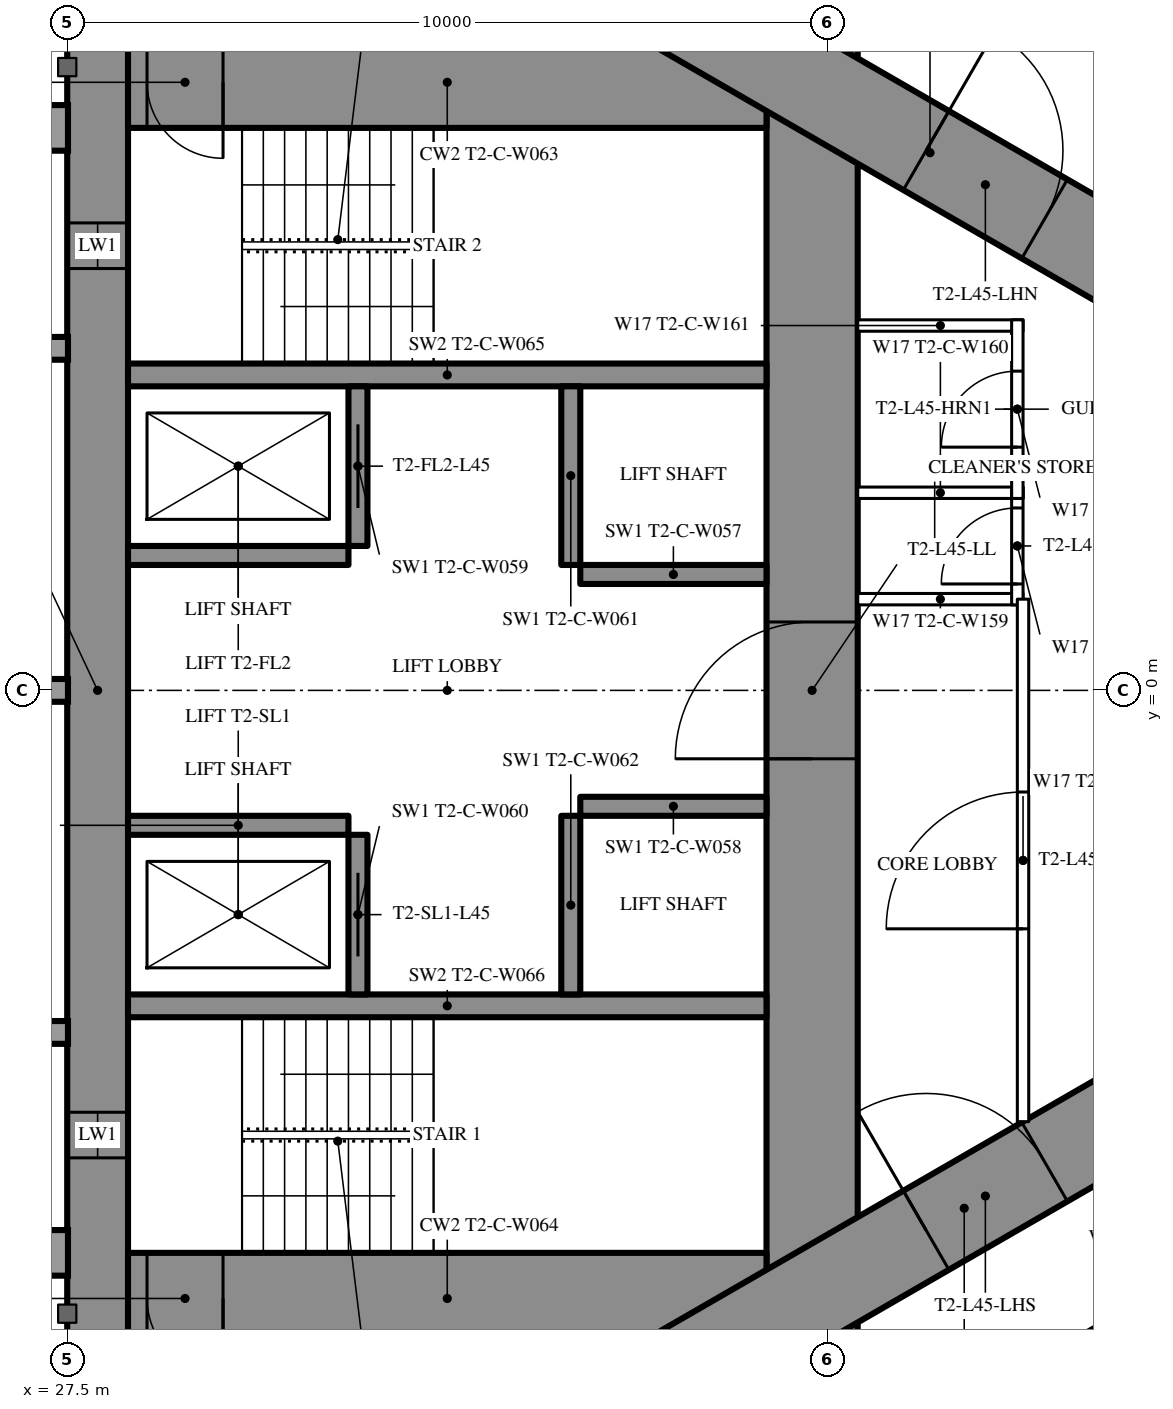
"""IFC4 building model, lengths in metres.
Left out: names, types, materials, properties, quantities, classifications, styles, units other than length and angle.
Written with IfcOpenShell. Run it as: python <this file> out.ifc"""

import sys

from ifc_helpers import new_model, si_unit, direction, frame, frame_2d, origin, place, context, subcontext, project, spatial, rectangle, extrude, element, fill, save


model = new_model("IFC4")
c1 = context("Model", 3, precision=1e-05, world=origin(), true_north=direction((0.0, 1.0)))
c2 = subcontext(c1, "Body", "Model", "MODEL_VIEW")
j1 = project(units=[si_unit("LENGTHUNIT", "METRE"), si_unit("PLANEANGLEUNIT", "RADIAN")], contexts=[c1])
p1 = place(None, origin())
s1 = spatial("IfcSite", under=j1, at=p1, CompositionType="ELEMENT")
p2 = place(p1, origin())
s2 = spatial("IfcBuilding", under=s1, at=p2, CompositionType="ELEMENT")
p3 = place(p2, frame((0.0, 0.0, 170.3)))
s3 = spatial("IfcBuildingStorey", under=s2, at=p3, CompositionType="ELEMENT", Elevation=170.3)
p4 = place(p3, frame((27.9, -8.6, 0.0), z_axis=(0.0, 0.0, 1.0), x_axis=(0.0, 1.0, 0.0)))
e1 = element("IfcWall", 1, at=p4, inside=s3, PredefinedType="SHEAR", context=c2, shape_type="SweptSolid", body=[
    extrude(rectangle(XDim=17.2, YDim=0.8, at=frame_2d((8.6, 0.0))), origin(), (0.0, 0.0, 1.0), 3.5),
])
p5 = place(p4, frame((2.45, 0.0, 0.6)))
e2 = element("IfcOpeningElement", 2, at=p5, cuts=e1, PredefinedType="OPENING", context=c2, shape_type="SweptSolid", body=[
    extrude(rectangle(XDim=0.6, YDim=2.1, at=frame_2d((0.3, 1.05))), frame((0.0, 0.41, 0.0), z_axis=(0.0, -1.0, 0.0), x_axis=(1.0, 0.0, 0.0)), (0.0, 0.0, 1.0), 0.82),
])
p6 = place(p4, frame((14.15, 0.0, 0.6)))
e3 = element("IfcOpeningElement", 3, at=p6, cuts=e1, PredefinedType="OPENING", context=c2, shape_type="SweptSolid", body=[
    extrude(rectangle(XDim=0.6, YDim=2.1, at=frame_2d((0.3, 1.05))), frame((0.0, 0.41, 0.0), z_axis=(0.0, -1.0, 0.0), x_axis=(1.0, 0.0, 0.0)), (0.0, 0.0, 1.0), 0.82),
])
p7 = place(p3, frame((37.3, -8.6, 0.0), z_axis=(0.0, 0.0, 1.0), x_axis=(0.0, 1.0, 0.0)))
e4 = element("IfcWall", 4, at=p7, inside=s3, PredefinedType="SHEAR", context=c2, shape_type="SweptSolid", body=[
    extrude(rectangle(XDim=17.2, YDim=1.2, at=frame_2d((8.6, 0.0))), origin(), (0.0, 0.0, 1.0), 3.5),
])
p8 = place(p7, frame((7.7, 0.0, 0.0)))
e5 = element("IfcOpeningElement", 5, at=p8, cuts=e4, PredefinedType="OPENING", context=c2, shape_type="SweptSolid", body=[
    extrude(rectangle(XDim=1.8, YDim=2.2, at=frame_2d((0.9, 1.1))), frame((0.0, 0.61, 0.0), z_axis=(0.0, -1.0, 0.0), x_axis=(1.0, 0.0, 0.0)), (0.0, 0.0, 1.0), 1.22),
])
p9 = place(p3, frame((28.3, -8.0, 0.0), z_axis=(0.0, 0.0, 1.0), x_axis=(1.0, 0.0, 0.0)))
e6 = element("IfcWall", 6, at=p9, inside=s3, PredefinedType="SHEAR", context=c2, shape_type="SweptSolid", body=[
    extrude(rectangle(XDim=8.4, YDim=1.2, at=frame_2d((4.2, 0.0))), origin(), (0.0, 0.0, 1.0), 3.5),
])
p10 = place(p9, frame((0.25, 0.0, 0.0)))
e7 = element("IfcOpeningElement", 7, at=p10, cuts=e6, PredefinedType="OPENING", context=c2, shape_type="SweptSolid", body=[
    extrude(rectangle(XDim=1.0, YDim=2.2, at=frame_2d((0.5, 1.1))), frame((0.0, 0.61, 0.0), z_axis=(0.0, -1.0, 0.0), x_axis=(1.0, 0.0, 0.0)), (0.0, 0.0, 1.0), 1.22),
])
p11 = place(p3, frame((28.3, 8.0, 0.0), z_axis=(0.0, 0.0, 1.0), x_axis=(1.0, 0.0, 0.0)))
e8 = element("IfcWall", 8, at=p11, inside=s3, PredefinedType="SHEAR", context=c2, shape_type="SweptSolid", body=[
    extrude(rectangle(XDim=8.4, YDim=1.2, at=frame_2d((4.2, 0.0))), origin(), (0.0, 0.0, 1.0), 3.5),
])
p12 = place(p11, frame((0.25, 0.0, 0.0)))
e9 = element("IfcOpeningElement", 9, at=p12, cuts=e8, PredefinedType="OPENING", context=c2, shape_type="SweptSolid", body=[
    extrude(rectangle(XDim=1.0, YDim=2.2, at=frame_2d((0.5, 1.1))), frame((0.0, 0.61, 0.0), z_axis=(0.0, -1.0, 0.0), x_axis=(1.0, 0.0, 0.0)), (0.0, 0.0, 1.0), 1.22),
])
for number, where, z_axis, x_axis in (
    (10, (28.3, -4.15, 0.0), (0.0, 0.0, 1.0), (1.0, 0.0, 0.0)),
    (11, (28.3, 4.15, 0.0), (0.0, 0.0, 1.0), (1.0, 0.0, 0.0)),
):
    element("IfcWall", number, at=place(p3, frame(where, z_axis=z_axis, x_axis=x_axis)), inside=s3, PredefinedType="SHEAR", context=c2, shape_type="SweptSolid", body=[
        extrude(rectangle(XDim=8.4, YDim=0.3, at=frame_2d((4.2, 0.0))), origin(), (0.0, 0.0, 1.0), 3.5),
    ])
p13 = place(p3, frame((31.325, -4.0, 0.0), z_axis=(0.0, 0.0, 1.0), x_axis=(0.0, 1.0, 0.0)))
e12 = element("IfcWall", 12, at=p13, inside=s3, PredefinedType="SHEAR", context=c2, shape_type="SweptSolid", body=[
    extrude(rectangle(XDim=2.1, YDim=0.25, at=frame_2d((1.05, 0.0))), origin(), (0.0, 0.0, 1.0), 3.5),
])
p14 = place(p13, frame((0.5, 0.0, 0.0)))
e13 = element("IfcOpeningElement", 13, at=p14, cuts=e12, PredefinedType="OPENING", context=c2, shape_type="SweptSolid", body=[
    extrude(rectangle(XDim=1.1, YDim=2.2, at=frame_2d((0.55, 1.1))), frame((0.0, 0.135, 0.0), z_axis=(0.0, -1.0, 0.0), x_axis=(1.0, 0.0, 0.0)), (0.0, 0.0, 1.0), 0.27),
])
p15 = place(p3, frame((34.125, -4.0, 0.0), z_axis=(0.0, 0.0, 1.0), x_axis=(0.0, 1.0, 0.0)))
e14 = element("IfcWall", 14, at=p15, inside=s3, PredefinedType="SHEAR", context=c2, shape_type="SweptSolid", body=[
    extrude(rectangle(XDim=2.35, YDim=0.25, at=frame_2d((1.175, 0.0))), origin(), (0.0, 0.0, 1.0), 3.5),
])
p16 = place(p3, frame((28.3, -1.775, 0.0), z_axis=(0.0, 0.0, 1.0), x_axis=(1.0, 0.0, 0.0)))
e15 = element("IfcWall", 15, at=p16, inside=s3, PredefinedType="SHEAR", context=c2, shape_type="SweptSolid", body=[
    extrude(rectangle(XDim=2.9, YDim=0.25, at=frame_2d((1.45, 0.0))), origin(), (0.0, 0.0, 1.0), 3.5),
])
p17 = place(p3, frame((34.25, -1.525, 0.0), z_axis=(0.0, 0.0, 1.0), x_axis=(1.0, 0.0, 0.0)))
e16 = element("IfcWall", 16, at=p17, inside=s3, PredefinedType="SHEAR", context=c2, shape_type="SweptSolid", body=[
    extrude(rectangle(XDim=2.45, YDim=0.25, at=frame_2d((1.225, 0.0))), origin(), (0.0, 0.0, 1.0), 3.5),
])
p18 = place(p3, frame((31.325, 1.9, 0.0), z_axis=(0.0, 0.0, 1.0), x_axis=(0.0, 1.0, 0.0)))
e17 = element("IfcWall", 17, at=p18, inside=s3, PredefinedType="SHEAR", context=c2, shape_type="SweptSolid", body=[
    extrude(rectangle(XDim=2.1, YDim=0.25, at=frame_2d((1.05, 0.0))), origin(), (0.0, 0.0, 1.0), 3.5),
])
p19 = place(p18, frame((0.5, 0.0, 0.0)))
e18 = element("IfcOpeningElement", 18, at=p19, cuts=e17, PredefinedType="OPENING", context=c2, shape_type="SweptSolid", body=[
    extrude(rectangle(XDim=1.1, YDim=2.2, at=frame_2d((0.55, 1.1))), frame((0.0, 0.135, 0.0), z_axis=(0.0, -1.0, 0.0), x_axis=(1.0, 0.0, 0.0)), (0.0, 0.0, 1.0), 0.27),
])
p20 = place(p3, frame((34.125, 1.65, 0.0), z_axis=(0.0, 0.0, 1.0), x_axis=(0.0, 1.0, 0.0)))
e19 = element("IfcWall", 19, at=p20, inside=s3, PredefinedType="SHEAR", context=c2, shape_type="SweptSolid", body=[
    extrude(rectangle(XDim=2.35, YDim=0.25, at=frame_2d((1.175, 0.0))), origin(), (0.0, 0.0, 1.0), 3.5),
])
p21 = place(p3, frame((28.3, 1.775, 0.0), z_axis=(0.0, 0.0, 1.0), x_axis=(1.0, 0.0, 0.0)))
e20 = element("IfcWall", 20, at=p21, inside=s3, PredefinedType="SHEAR", context=c2, shape_type="SweptSolid", body=[
    extrude(rectangle(XDim=2.9, YDim=0.25, at=frame_2d((1.45, 0.0))), origin(), (0.0, 0.0, 1.0), 3.5),
])
p22 = place(p3, frame((34.25, 1.525, 0.0), z_axis=(0.0, 0.0, 1.0), x_axis=(1.0, 0.0, 0.0)))
e21 = element("IfcWall", 21, at=p22, inside=s3, PredefinedType="SHEAR", context=c2, shape_type="SweptSolid", body=[
    extrude(rectangle(XDim=2.45, YDim=0.25, at=frame_2d((1.225, 0.0))), origin(), (0.0, 0.0, 1.0), 3.5),
])
p23 = place(p3, frame((27.2, -13.8, 0.0), z_axis=(0.0, 0.0, 1.0), x_axis=(0.866027159892, 0.499996958321, 0.0)))
e22 = element("IfcWall", 22, at=p23, inside=s3, PredefinedType="SHEAR", context=c2, shape_type="SweptSolid", body=[
    extrude(rectangle(XDim=27.947, YDim=1.2, at=frame_2d((13.973, 0.0))), origin(), (0.0, 0.0, 1.0), 3.5),
])
p24 = place(p23, frame((4.6, 0.0, 0.0)))
e23 = element("IfcOpeningElement", 23, at=p24, cuts=e22, PredefinedType="OPENING", context=c2, shape_type="SweptSolid", body=[
    extrude(rectangle(XDim=1.0, YDim=2.2, at=frame_2d((0.5, 1.1))), frame((0.0, 0.61, 0.0), z_axis=(0.0, -1.0, 0.0), x_axis=(1.0, 0.0, 0.0)), (0.0, 0.0, 1.0), 1.22),
])
p25 = place(p23, frame((13.395, 0.0, 0.0)))
e24 = element("IfcOpeningElement", 24, at=p25, cuts=e22, PredefinedType="OPENING", context=c2, shape_type="SweptSolid", body=[
    extrude(rectangle(XDim=1.8, YDim=2.2, at=frame_2d((0.9, 1.1))), frame((0.0, 0.61, 0.0), z_axis=(0.0, -1.0, 0.0), x_axis=(1.0, 0.0, 0.0)), (0.0, 0.0, 1.0), 1.22),
])
p26 = place(p3, frame((27.2, 13.8, 0.0), z_axis=(0.0, 0.0, 1.0), x_axis=(0.866024515034, -0.500001539357, 0.0)))
e25 = element("IfcWall", 25, at=p26, inside=s3, PredefinedType="SHEAR", context=c2, shape_type="SweptSolid", body=[
    extrude(rectangle(XDim=26.907, YDim=1.2, at=frame_2d((13.454, 0.0))), origin(), (0.0, 0.0, 1.0), 3.5),
])
p27 = place(p26, frame((4.6, 0.0, 0.0)))
e26 = element("IfcOpeningElement", 26, at=p27, cuts=e25, PredefinedType="OPENING", context=c2, shape_type="SweptSolid", body=[
    extrude(rectangle(XDim=1.0, YDim=2.2, at=frame_2d((0.5, 1.1))), frame((0.0, 0.61, 0.0), z_axis=(0.0, -1.0, 0.0), x_axis=(1.0, 0.0, 0.0)), (0.0, 0.0, 1.0), 1.22),
])
p28 = place(p26, frame((13.395, 0.0, 0.0)))
e27 = element("IfcOpeningElement", 27, at=p28, cuts=e25, PredefinedType="OPENING", context=c2, shape_type="SweptSolid", body=[
    extrude(rectangle(XDim=1.8, YDim=2.2, at=frame_2d((0.9, 1.1))), frame((0.0, 0.61, 0.0), z_axis=(0.0, -1.0, 0.0), x_axis=(1.0, 0.0, 0.0)), (0.0, 0.0, 1.0), 1.22),
])
p29 = place(p3, frame((27.959, -16.017, 0.0), z_axis=(0.0, 0.0, 1.0), x_axis=(0.866024151371, 0.500002169237, 0.0)))
e28 = element("IfcWall", 28, at=p29, inside=s3, PredefinedType="PARTITIONING", context=c2, shape_type="SweptSolid", body=[
    extrude(rectangle(XDim=32.034, YDim=0.2, at=frame_2d((16.017, 0.0))), origin(), (0.0, 0.0, 1.0), 3.25),
])
p30 = place(p29, frame((4.765, 0.0, 0.0)))
e29 = element("IfcOpeningElement", 29, at=p30, cuts=e28, PredefinedType="OPENING", context=c2, shape_type="SweptSolid", body=[
    extrude(rectangle(XDim=0.95, YDim=2.2, at=frame_2d((0.475, 1.1))), frame((0.0, 0.11, 0.0), z_axis=(0.0, -1.0, 0.0), x_axis=(1.0, 0.0, 0.0)), (0.0, 0.0, 1.0), 0.22),
])
p31 = place(p29, frame((9.215, 0.0, 0.0)))
e30 = element("IfcOpeningElement", 30, at=p31, cuts=e28, PredefinedType="OPENING", context=c2, shape_type="SweptSolid", body=[
    extrude(rectangle(XDim=1.0, YDim=2.2, at=frame_2d((0.5, 1.1))), frame((0.0, 0.11, 0.0), z_axis=(0.0, -1.0, 0.0), x_axis=(1.0, 0.0, 0.0)), (0.0, 0.0, 1.0), 0.22),
])
p32 = place(p29, frame((19.725, 0.0, 0.0)))
e31 = element("IfcOpeningElement", 31, at=p32, cuts=e28, PredefinedType="OPENING", context=c2, shape_type="SweptSolid", body=[
    extrude(rectangle(XDim=0.95, YDim=2.2, at=frame_2d((0.475, 1.1))), frame((0.0, 0.11, 0.0), z_axis=(0.0, -1.0, 0.0), x_axis=(1.0, 0.0, 0.0)), (0.0, 0.0, 1.0), 0.22),
])
p33 = place(p29, frame((26.125, 0.0, 0.0)))
e32 = element("IfcOpeningElement", 32, at=p33, cuts=e28, PredefinedType="OPENING", context=c2, shape_type="SweptSolid", body=[
    extrude(rectangle(XDim=0.95, YDim=2.2, at=frame_2d((0.475, 1.1))), frame((0.0, 0.11, 0.0), z_axis=(0.0, -1.0, 0.0), x_axis=(1.0, 0.0, 0.0)), (0.0, 0.0, 1.0), 0.22),
])
p34 = place(p29, frame((28.106, 0.0, 0.0)))
e33 = element("IfcOpeningElement", 33, at=p34, cuts=e28, PredefinedType="OPENING", context=c2, shape_type="SweptSolid", body=[
    extrude(rectangle(XDim=0.95, YDim=2.2, at=frame_2d((0.475, 1.1))), frame((0.0, 0.11, 0.0), z_axis=(0.0, -1.0, 0.0), x_axis=(1.0, 0.0, 0.0)), (0.0, 0.0, 1.0), 0.22),
])
for number, where, z_axis, x_axis in (
    (34, (37.9, 1.2, 0.0), (0.0, 0.0, 1.0), (1.0, 0.0, 0.0)),
    (35, (37.9, 2.6, 0.0), (0.0, 0.0, 1.0), (1.0, 0.0, 0.0)),
    (36, (37.9, 4.8, 0.0), (0.0, 0.0, 1.0), (1.0, 0.0, 0.0)),
):
    element("IfcWall", number, at=place(p3, frame(where, z_axis=z_axis, x_axis=x_axis)), inside=s3, PredefinedType="PARTITIONING", context=c2, shape_type="SweptSolid", body=[
        extrude(rectangle(XDim=2.175, YDim=0.15, at=frame_2d((1.087, 0.0))), origin(), (0.0, 0.0, 1.0), 3.25),
    ])
p35 = place(p3, frame((40.0, 1.125, 0.0), z_axis=(0.0, 0.0, 1.0), x_axis=(0.0, 1.0, 0.0)))
e37 = element("IfcWall", 37, at=p35, inside=s3, PredefinedType="PARTITIONING", context=c2, shape_type="SweptSolid", body=[
    extrude(rectangle(XDim=1.55, YDim=0.15, at=frame_2d((0.775, 0.0))), origin(), (0.0, 0.0, 1.0), 3.25),
])
p36 = place(p35, frame((0.275, 0.0, 0.0)))
e38 = element("IfcOpeningElement", 38, at=p36, cuts=e37, PredefinedType="OPENING", context=c2, shape_type="SweptSolid", body=[
    extrude(rectangle(XDim=1.0, YDim=2.2, at=frame_2d((0.5, 1.1))), frame((0.0, 0.085, 0.0), z_axis=(0.0, -1.0, 0.0), x_axis=(1.0, 0.0, 0.0)), (0.0, 0.0, 1.0), 0.17),
])
p37 = place(p3, frame((40.0, 2.525, 0.0), z_axis=(0.0, 0.0, 1.0), x_axis=(0.0, 1.0, 0.0)))
e39 = element("IfcWall", 39, at=p37, inside=s3, PredefinedType="PARTITIONING", context=c2, shape_type="SweptSolid", body=[
    extrude(rectangle(XDim=2.35, YDim=0.15, at=frame_2d((1.175, 0.0))), origin(), (0.0, 0.0, 1.0), 3.25),
])
p38 = place(p37, frame((0.675, 0.0, 0.0)))
e40 = element("IfcOpeningElement", 40, at=p38, cuts=e39, PredefinedType="OPENING", context=c2, shape_type="SweptSolid", body=[
    extrude(rectangle(XDim=1.0, YDim=2.2, at=frame_2d((0.5, 1.1))), frame((0.0, 0.085, 0.0), z_axis=(0.0, -1.0, 0.0), x_axis=(1.0, 0.0, 0.0)), (0.0, 0.0, 1.0), 0.17),
])
p39 = place(p3, frame((40.075, -5.674, 0.0), z_axis=(0.0, 0.0, 1.0), x_axis=(0.0, 1.0, 0.0)))
e41 = element("IfcWall", 41, at=p39, inside=s3, PredefinedType="PARTITIONING", context=c2, shape_type="SweptSolid", body=[
    extrude(rectangle(XDim=6.874, YDim=0.15, at=frame_2d((3.437, 0.0))), origin(), (0.0, 0.0, 1.0), 3.25),
])
p40 = place(p39, frame((2.537, 0.0, 0.0)))
e42 = element("IfcOpeningElement", 42, at=p40, cuts=e41, PredefinedType="OPENING", context=c2, shape_type="SweptSolid", body=[
    extrude(rectangle(XDim=1.8, YDim=2.2, at=frame_2d((0.9, 1.1))), frame((0.0, 0.085, 0.0), z_axis=(0.0, -1.0, 0.0), x_axis=(1.0, 0.0, 0.0)), (0.0, 0.0, 1.0), 0.17),
])
p41 = place(p36, origin())
e43 = element("IfcDoor", 43, at=p41, inside=s3, OperationType="SINGLE_SWING_LEFT", PredefinedType="DOOR", context=c2, shape_type="SweptSolid", body=[
    extrude(rectangle(XDim=1.0, YDim=2.2, at=frame_2d((0.5, 1.1))), frame((0.0, 0.025, 0.0), z_axis=(0.0, -1.0, 0.0), x_axis=(1.0, 0.0, 0.0)), (0.0, 0.0, 1.0), 0.05),
])
fill(e38, e43)
p42 = place(p38, origin())
e44 = element("IfcDoor", 44, at=p42, inside=s3, OperationType="SINGLE_SWING_LEFT", PredefinedType="DOOR", context=c2, shape_type="SweptSolid", body=[
    extrude(rectangle(XDim=1.0, YDim=2.2, at=frame_2d((0.5, 1.1))), frame((0.0, 0.025, 0.0), z_axis=(0.0, -1.0, 0.0), x_axis=(1.0, 0.0, 0.0)), (0.0, 0.0, 1.0), 0.05),
])
fill(e40, e44)
p43 = place(p40, origin())
e45 = element("IfcDoor", 45, at=p43, inside=s3, OperationType="DOUBLE_DOOR_SINGLE_SWING", PredefinedType="DOOR", context=c2, shape_type="SweptSolid", body=[
    extrude(rectangle(XDim=1.8, YDim=2.2, at=frame_2d((0.9, 1.1))), frame((0.0, 0.025, 0.0), z_axis=(0.0, -1.0, 0.0), x_axis=(1.0, 0.0, 0.0)), (0.0, 0.0, 1.0), 0.05),
])
fill(e42, e45)
p44 = place(p25, origin())
e46 = element("IfcDoor", 46, at=p44, inside=s3, OperationType="DOUBLE_DOOR_SINGLE_SWING", PredefinedType="DOOR", context=c2, shape_type="SweptSolid", body=[
    extrude(rectangle(XDim=1.8, YDim=2.2, at=frame_2d((0.9, 1.1))), frame((0.0, 0.025, 0.0), z_axis=(0.0, -1.0, 0.0), x_axis=(1.0, 0.0, 0.0)), (0.0, 0.0, 1.0), 0.05),
])
fill(e24, e46)
p45 = place(p28, origin())
e47 = element("IfcDoor", 47, at=p45, inside=s3, OperationType="DOUBLE_DOOR_SINGLE_SWING", PredefinedType="DOOR", context=c2, shape_type="SweptSolid", body=[
    extrude(rectangle(XDim=1.8, YDim=2.2, at=frame_2d((0.9, 1.1))), frame((0.0, 0.025, 0.0), z_axis=(0.0, -1.0, 0.0), x_axis=(1.0, 0.0, 0.0)), (0.0, 0.0, 1.0), 0.05),
])
fill(e27, e47)
p46 = place(p8, origin())
e48 = element("IfcDoor", 48, at=p46, inside=s3, OperationType="DOUBLE_DOOR_SINGLE_SWING", PredefinedType="DOOR", context=c2, shape_type="SweptSolid", body=[
    extrude(rectangle(XDim=1.8, YDim=2.2, at=frame_2d((0.9, 1.1))), frame((0.0, 0.025, 0.0), z_axis=(0.0, -1.0, 0.0), x_axis=(1.0, 0.0, 0.0)), (0.0, 0.0, 1.0), 0.05),
])
fill(e5, e48)
p47 = place(p10, origin())
e49 = element("IfcDoor", 49, at=p47, inside=s3, OperationType="SINGLE_SWING_RIGHT", PredefinedType="DOOR", context=c2, shape_type="SweptSolid", body=[
    extrude(rectangle(XDim=1.0, YDim=2.2, at=frame_2d((0.5, 1.1))), frame((0.0, 0.025, 0.0), z_axis=(0.0, -1.0, 0.0), x_axis=(1.0, 0.0, 0.0)), (0.0, 0.0, 1.0), 0.05),
])
fill(e7, e49)
p48 = place(p12, origin())
e50 = element("IfcDoor", 50, at=p48, inside=s3, OperationType="SINGLE_SWING_RIGHT", PredefinedType="DOOR", context=c2, shape_type="SweptSolid", body=[
    extrude(rectangle(XDim=1.0, YDim=2.2, at=frame_2d((0.5, 1.1))), frame((0.0, 0.025, 0.0), z_axis=(0.0, -1.0, 0.0), x_axis=(1.0, 0.0, 0.0)), (0.0, 0.0, 1.0), 0.05),
])
fill(e9, e50)
p49 = place(p14, origin())
e51 = element("IfcDoor", 51, at=p49, inside=s3, OperationType="SLIDING_TO_LEFT", PredefinedType="USERDEFINED", context=c2, shape_type="SweptSolid", body=[
    extrude(rectangle(XDim=1.1, YDim=2.2, at=frame_2d((0.55, 1.1))), frame((0.0, 0.025, 0.0), z_axis=(0.0, -1.0, 0.0), x_axis=(1.0, 0.0, 0.0)), (0.0, 0.0, 1.0), 0.05),
])
fill(e13, e51)
p50 = place(p19, origin())
e52 = element("IfcDoor", 52, at=p50, inside=s3, OperationType="SLIDING_TO_LEFT", PredefinedType="USERDEFINED", context=c2, shape_type="SweptSolid", body=[
    extrude(rectangle(XDim=1.1, YDim=2.2, at=frame_2d((0.55, 1.1))), frame((0.0, 0.025, 0.0), z_axis=(0.0, -1.0, 0.0), x_axis=(1.0, 0.0, 0.0)), (0.0, 0.0, 1.0), 0.05),
])
fill(e18, e52)
p51 = place(p5, origin())
e53 = element("IfcWindow", 53, at=p51, inside=s3, PartitioningType="SINGLE_PANEL", PredefinedType="WINDOW", context=c2, shape_type="SweptSolid", body=[
    extrude(rectangle(XDim=0.6, YDim=2.1, at=frame_2d((0.3, 1.05))), frame((0.0, 0.03, 0.0), z_axis=(0.0, -1.0, 0.0), x_axis=(1.0, 0.0, 0.0)), (0.0, 0.0, 1.0), 0.06),
])
fill(e2, e53)
p52 = place(p6, origin())
e54 = element("IfcWindow", 54, at=p52, inside=s3, PartitioningType="SINGLE_PANEL", PredefinedType="WINDOW", context=c2, shape_type="SweptSolid", body=[
    extrude(rectangle(XDim=0.6, YDim=2.1, at=frame_2d((0.3, 1.05))), frame((0.0, 0.03, 0.0), z_axis=(0.0, -1.0, 0.0), x_axis=(1.0, 0.0, 0.0)), (0.0, 0.0, 1.0), 0.06),
])
fill(e3, e54)
save(model, sys.argv[1])
